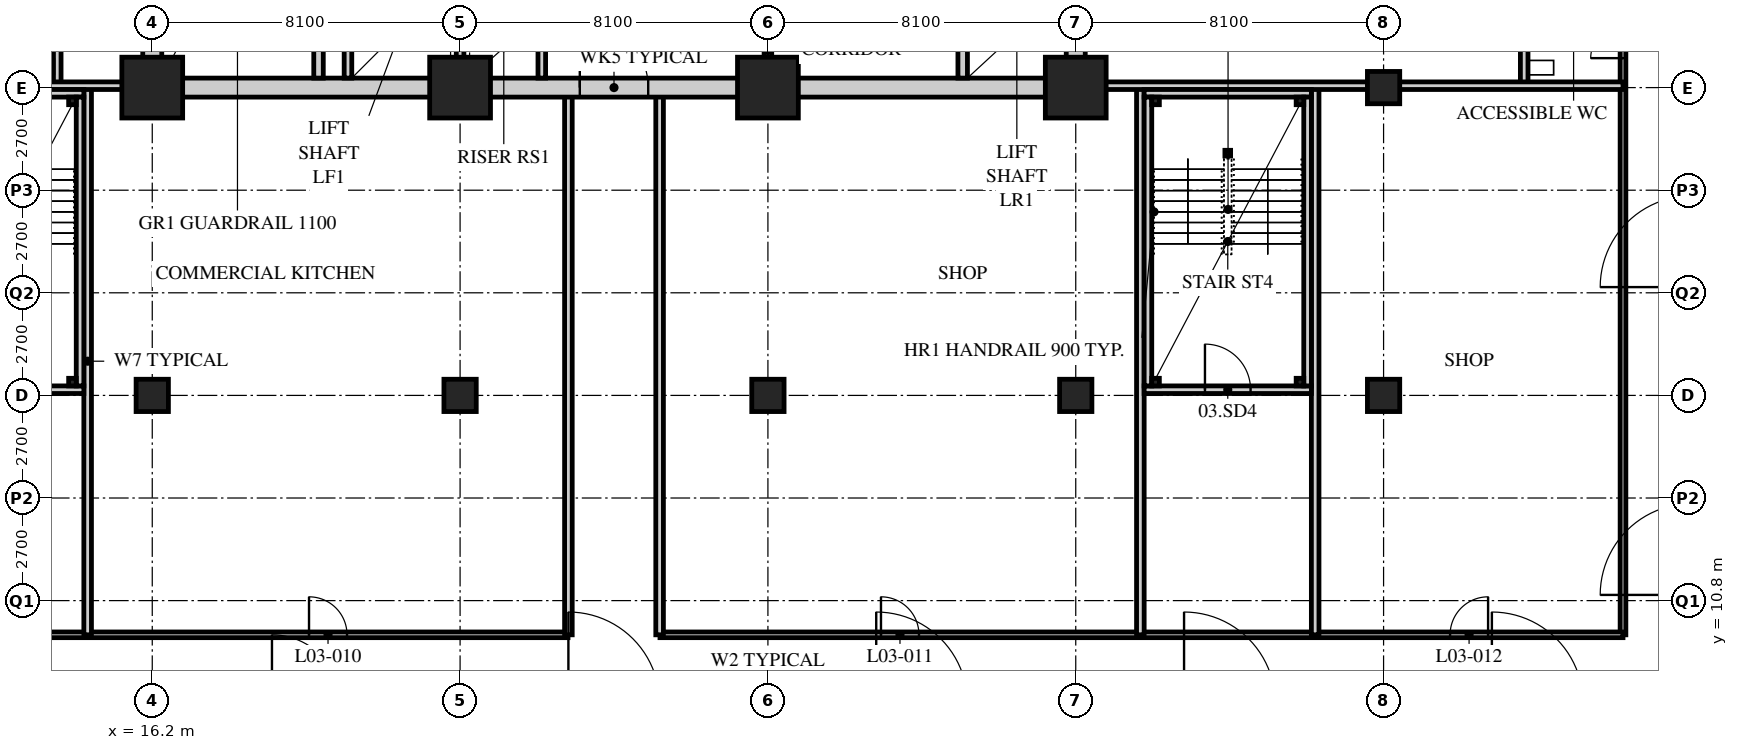
"""IFC4 building model, lengths in metres.
Left out: names, types, materials, properties, quantities, classifications, styles, units other than length and angle.
Written with IfcOpenShell. Run it as: python <this file> out.ifc"""

import sys

from ifc_helpers import new_model, si_unit, direction, frame, frame_2d, origin, origin_2d, place, context, subcontext, project, spatial, rectangle, hollow_rectangle, extrude, element, fill, save


model = new_model("IFC4")
c1 = context("Model", 3, precision=1e-05, world=origin(), true_north=direction((0.0, 1.0)))
c2 = subcontext(c1, "Body", "Model", "MODEL_VIEW")
j1 = project(units=[si_unit("LENGTHUNIT", "METRE"), si_unit("PLANEANGLEUNIT", "RADIAN")], contexts=[c1])
p1 = place(None, origin())
s1 = spatial("IfcSite", under=j1, at=p1, CompositionType="ELEMENT")
p2 = place(p1, origin())
s2 = spatial("IfcBuilding", under=s1, at=p2, CompositionType="ELEMENT")
p3 = place(p2, frame((0.0, 0.0, 16.8)))
s3 = spatial("IfcBuildingStorey", under=s2, at=p3, CompositionType="ELEMENT", Elevation=16.8)
p4 = place(p3, frame((16.2, 16.2, 0.0), z_axis=(0.0, 0.0, 1.0), x_axis=(1.0, 0.0, 0.0)))
e1 = element("IfcColumn", 1, at=p4, inside=s3, PredefinedType="COLUMN", context=c2, shape_type="SweptSolid", body=[
    extrude(hollow_rectangle(XDim=0.85, YDim=0.85, WallThickness=0.085, at=origin_2d()), origin(), (0.0, 0.0, 1.0), 5.4),
])
p5 = place(p3, frame((16.2, 24.3, 0.0), z_axis=(0.0, 0.0, 1.0), x_axis=(1.0, 0.0, 0.0)))
e2 = element("IfcColumn", 2, at=p5, inside=s3, PredefinedType="COLUMN", context=c2, shape_type="SweptSolid", body=[
    extrude(hollow_rectangle(XDim=1.6, YDim=1.6, WallThickness=0.15, at=origin_2d()), origin(), (0.0, 0.0, 1.0), 5.4),
])
p6 = place(p3, frame((24.3, 16.2, 0.0), z_axis=(0.0, 0.0, 1.0), x_axis=(1.0, 0.0, 0.0)))
e3 = element("IfcColumn", 3, at=p6, inside=s3, PredefinedType="COLUMN", context=c2, shape_type="SweptSolid", body=[
    extrude(hollow_rectangle(XDim=0.85, YDim=0.85, WallThickness=0.085, at=origin_2d()), origin(), (0.0, 0.0, 1.0), 5.4),
])
p7 = place(p3, frame((24.3, 24.3, 0.0), z_axis=(0.0, 0.0, 1.0), x_axis=(1.0, 0.0, 0.0)))
e4 = element("IfcColumn", 4, at=p7, inside=s3, PredefinedType="COLUMN", context=c2, shape_type="SweptSolid", body=[
    extrude(hollow_rectangle(XDim=1.6, YDim=1.6, WallThickness=0.15, at=origin_2d()), origin(), (0.0, 0.0, 1.0), 5.4),
])
p8 = place(p3, frame((32.4, 16.2, 0.0), z_axis=(0.0, 0.0, 1.0), x_axis=(1.0, 0.0, 0.0)))
e5 = element("IfcColumn", 5, at=p8, inside=s3, PredefinedType="COLUMN", context=c2, shape_type="SweptSolid", body=[
    extrude(hollow_rectangle(XDim=0.85, YDim=0.85, WallThickness=0.085, at=origin_2d()), origin(), (0.0, 0.0, 1.0), 5.4),
])
p9 = place(p3, frame((32.4, 24.3, 0.0), z_axis=(0.0, 0.0, 1.0), x_axis=(1.0, 0.0, 0.0)))
e6 = element("IfcColumn", 6, at=p9, inside=s3, PredefinedType="COLUMN", context=c2, shape_type="SweptSolid", body=[
    extrude(hollow_rectangle(XDim=1.6, YDim=1.6, WallThickness=0.15, at=origin_2d()), origin(), (0.0, 0.0, 1.0), 5.4),
])
p10 = place(p3, frame((40.5, 16.2, 0.0), z_axis=(0.0, 0.0, 1.0), x_axis=(1.0, 0.0, 0.0)))
e7 = element("IfcColumn", 7, at=p10, inside=s3, PredefinedType="COLUMN", context=c2, shape_type="SweptSolid", body=[
    extrude(hollow_rectangle(XDim=0.85, YDim=0.85, WallThickness=0.085, at=origin_2d()), origin(), (0.0, 0.0, 1.0), 5.4),
])
p11 = place(p3, frame((40.5, 24.3, 0.0), z_axis=(0.0, 0.0, 1.0), x_axis=(1.0, 0.0, 0.0)))
e8 = element("IfcColumn", 8, at=p11, inside=s3, PredefinedType="COLUMN", context=c2, shape_type="SweptSolid", body=[
    extrude(hollow_rectangle(XDim=1.6, YDim=1.6, WallThickness=0.15, at=origin_2d()), origin(), (0.0, 0.0, 1.0), 5.4),
])
for number, where, z_axis, x_axis in (
    (9, (48.6, 16.2, 0.0), (0.0, 0.0, 1.0), (1.0, 0.0, 0.0)),
    (10, (48.6, 24.3, 0.0), (0.0, 0.0, 1.0), (1.0, 0.0, 0.0)),
):
    element("IfcColumn", number, at=place(p3, frame(where, z_axis=z_axis, x_axis=x_axis)), inside=s3, PredefinedType="COLUMN", context=c2, shape_type="SweptSolid", body=[
        extrude(hollow_rectangle(XDim=0.85, YDim=0.85, WallThickness=0.085, at=origin_2d()), origin(), (0.0, 0.0, 1.0), 5.4),
    ])
p12 = place(p3, frame((54.9, 9.9, 0.0), z_axis=(0.0, 0.0, 1.0), x_axis=(0.0, 1.0, 0.0)))
e11 = element("IfcWall", 11, at=p12, inside=s3, PredefinedType="PARTITIONING", context=c2, shape_type="SweptSolid", body=[
    extrude(rectangle(XDim=30.75, YDim=0.15, at=frame_2d((15.375, 0.0))), origin(), (0.0, 0.0, 1.0), 5.15),
])
p13 = place(p12, frame((15.175, 0.0, 0.0)))
e12 = element("IfcOpeningElement", 12, at=p13, cuts=e11, PredefinedType="OPENING", context=c2, shape_type="SweptSolid", body=[
    extrude(rectangle(XDim=0.85, YDim=2.1, at=frame_2d((0.425, 1.05))), frame((0.0, 0.085, 0.0), z_axis=(0.0, -1.0, 0.0), x_axis=(1.0, 0.0, 0.0)), (0.0, 0.0, 1.0), 0.17),
])
p14 = place(p12, frame((17.725, 0.0, 0.0)))
e13 = element("IfcOpeningElement", 13, at=p14, cuts=e11, PredefinedType="OPENING", context=c2, shape_type="SweptSolid", body=[
    extrude(rectangle(XDim=1.0, YDim=2.1, at=frame_2d((0.5, 1.05))), frame((0.0, 0.085, 0.0), z_axis=(0.0, -1.0, 0.0), x_axis=(1.0, 0.0, 0.0)), (0.0, 0.0, 1.0), 0.17),
])
p15 = place(p12, frame((20.575, 0.0, 0.0)))
e14 = element("IfcOpeningElement", 14, at=p15, cuts=e11, PredefinedType="OPENING", context=c2, shape_type="SweptSolid", body=[
    extrude(rectangle(XDim=1.0, YDim=2.1, at=frame_2d((0.5, 1.05))), frame((0.0, 0.085, 0.0), z_axis=(0.0, -1.0, 0.0), x_axis=(1.0, 0.0, 0.0)), (0.0, 0.0, 1.0), 0.17),
])
p16 = place(p12, frame((24.025, 0.0, 0.0)))
e15 = element("IfcOpeningElement", 15, at=p16, cuts=e11, PredefinedType="OPENING", context=c2, shape_type="SweptSolid", body=[
    extrude(rectangle(XDim=1.0, YDim=2.1, at=frame_2d((0.5, 1.05))), frame((0.0, 0.085, 0.0), z_axis=(0.0, -1.0, 0.0), x_axis=(1.0, 0.0, 0.0)), (0.0, 0.0, 1.0), 0.17),
])
p17 = place(p12, frame((28.075, 0.0, 0.0)))
e16 = element("IfcOpeningElement", 16, at=p17, cuts=e11, PredefinedType="OPENING", context=c2, shape_type="SweptSolid", body=[
    extrude(rectangle(XDim=1.0, YDim=2.1, at=frame_2d((0.5, 1.05))), frame((0.0, 0.085, 0.0), z_axis=(0.0, -1.0, 0.0), x_axis=(1.0, 0.0, 0.0)), (0.0, 0.0, 1.0), 0.17),
])
p18 = place(p3, frame((9.9, 9.9, 0.0), z_axis=(0.0, 0.0, 1.0), x_axis=(1.0, 0.0, 0.0)))
e17 = element("IfcWall", 17, at=p18, inside=s3, PredefinedType="PARTITIONING", context=c2, shape_type="SweptSolid", body=[
    extrude(rectangle(XDim=17.24, YDim=0.15, at=frame_2d((8.62, 0.0))), origin(), (0.0, 0.0, 1.0), 5.15),
])
p19 = place(p18, frame((10.425, 0.0, 0.0)))
e18 = element("IfcOpeningElement", 18, at=p19, cuts=e17, PredefinedType="OPENING", context=c2, shape_type="SweptSolid", body=[
    extrude(rectangle(XDim=1.0, YDim=2.1, at=frame_2d((0.5, 1.05))), frame((0.0, 0.085, 0.0), z_axis=(0.0, -1.0, 0.0), x_axis=(1.0, 0.0, 0.0)), (0.0, 0.0, 1.0), 0.17),
])
p20 = place(p3, frame((29.56, 9.9, 0.0), z_axis=(0.0, 0.0, 1.0), x_axis=(1.0, 0.0, 0.0)))
e19 = element("IfcWall", 19, at=p20, inside=s3, PredefinedType="PARTITIONING", context=c2, shape_type="SweptSolid", body=[
    extrude(rectangle(XDim=25.34, YDim=0.15, at=frame_2d((12.67, 0.0))), origin(), (0.0, 0.0, 1.0), 5.15),
])
p21 = place(p20, frame((5.815, 0.0, 0.0)))
e20 = element("IfcOpeningElement", 20, at=p21, cuts=e19, PredefinedType="OPENING", context=c2, shape_type="SweptSolid", body=[
    extrude(rectangle(XDim=1.0, YDim=2.1, at=frame_2d((0.5, 1.05))), frame((0.0, 0.085, 0.0), z_axis=(0.0, -1.0, 0.0), x_axis=(1.0, 0.0, 0.0)), (0.0, 0.0, 1.0), 0.17),
])
p22 = place(p20, frame((20.79, 0.0, 0.0)))
e21 = element("IfcOpeningElement", 21, at=p22, cuts=e19, PredefinedType="OPENING", context=c2, shape_type="SweptSolid", body=[
    extrude(rectangle(XDim=1.0, YDim=2.1, at=frame_2d((0.5, 1.05))), frame((0.0, 0.085, 0.0), z_axis=(0.0, -1.0, 0.0), x_axis=(1.0, 0.0, 0.0)), (0.0, 0.0, 1.0), 0.17),
])
p23 = place(p3, frame((13.7, 24.3, 0.0), z_axis=(0.0, 0.0, 1.0), x_axis=(0.0, 1.0, 0.0)))
e22 = element("IfcWall", 22, at=p23, inside=s3, PredefinedType="SOLIDWALL", context=c2, shape_type="SweptSolid", body=[
    extrude(rectangle(XDim=4.8, YDim=0.2, at=frame_2d((2.4, 0.0))), origin(), (0.0, 0.0, 1.0), 5.15),
])
p24 = place(p3, frame((52.3, 24.3, 0.0), z_axis=(0.0, 0.0, 1.0), x_axis=(0.0, 1.0, 0.0)))
e23 = element("IfcWall", 23, at=p24, inside=s3, PredefinedType="SOLIDWALL", context=c2, shape_type="SweptSolid", body=[
    extrude(rectangle(XDim=2.4, YDim=0.2, at=frame_2d((1.2, 0.0))), origin(), (0.0, 0.0, 1.0), 5.15),
])
for number, where, z_axis, x_axis in (
    (24, (14.5, 9.9, 0.0), (0.0, 0.0, 1.0), (0.0, 1.0, 0.0)),
    (25, (42.2, 9.9, 0.0), (0.0, 0.0, 1.0), (0.0, 1.0, 0.0)),
    (26, (46.8, 9.9, 0.0), (0.0, 0.0, 1.0), (0.0, 1.0, 0.0)),
    (27, (27.15, 9.9, 0.0), (0.0, 0.0, 1.0), (0.0, 1.0, 0.0)),
    (28, (29.55, 9.9, 0.0), (0.0, 0.0, 1.0), (0.0, 1.0, 0.0)),
):
    element("IfcWall", number, at=place(p3, frame(where, z_axis=z_axis, x_axis=x_axis)), inside=s3, PredefinedType="SOLIDWALL", context=c2, shape_type="SweptSolid", body=[
        extrude(rectangle(XDim=14.4, YDim=0.2, at=frame_2d((7.2, 0.0))), origin(), (0.0, 0.0, 1.0), 5.15),
    ])
p25 = place(p3, frame((9.9, 24.35, 0.0), z_axis=(0.0, 0.0, 1.0), x_axis=(1.0, 0.0, 0.0)))
e29 = element("IfcWall", 29, at=p25, inside=s3, PredefinedType="SOLIDWALL", context=c2, shape_type="SweptSolid", body=[
    extrude(rectangle(XDim=6.3, YDim=0.2, at=frame_2d((3.15, 0.0))), origin(), (0.0, 0.0, 1.0), 4.538),
])
p26 = place(p3, frame((40.5, 24.35, 0.0), z_axis=(0.0, 0.0, 1.0), x_axis=(1.0, 0.0, 0.0)))
e30 = element("IfcWall", 30, at=p26, inside=s3, PredefinedType="SOLIDWALL", context=c2, shape_type="SweptSolid", body=[
    extrude(rectangle(XDim=14.4, YDim=0.2, at=frame_2d((7.2, 0.0))), origin(), (0.0, 0.0, 1.0), 4.538),
])
p27 = place(p3, frame((15.95, 24.3, 0.0), z_axis=(0.0, 0.0, 1.0), x_axis=(1.0, 0.0, 0.0)))
e31 = element("IfcWall", 31, at=p27, inside=s3, PredefinedType="SOLIDWALL", context=c2, shape_type="SweptSolid", body=[
    extrude(rectangle(XDim=24.8, YDim=0.5, at=frame_2d((12.4, 0.0))), origin(), (0.0, 0.0, 1.0), 4.5),
])
p28 = place(p27, frame((11.5, 0.0, 0.0)))
e32 = element("IfcOpeningElement", 32, at=p28, cuts=e31, PredefinedType="OPENING", context=c2, shape_type="SweptSolid", body=[
    extrude(rectangle(XDim=1.8, YDim=2.4, at=frame_2d((0.9, 1.2))), frame((0.0, 0.26, 0.0), z_axis=(0.0, -1.0, 0.0), x_axis=(1.0, 0.0, 0.0)), (0.0, 0.0, 1.0), 0.52),
])
for number, where, z_axis, x_axis in (
    (33, (16.2, 24.55, 0.0), (0.0, 0.0, 1.0), (0.0, 1.0, 0.0)),
    (34, (40.5, 24.55, 0.0), (0.0, 0.0, 1.0), (0.0, 1.0, 0.0)),
):
    element("IfcWall", number, at=place(p3, frame(where, z_axis=z_axis, x_axis=x_axis)), inside=s3, PredefinedType="SOLIDWALL", context=c2, shape_type="SweptSolid", body=[
        extrude(rectangle(XDim=15.7, YDim=0.5, at=frame_2d((7.85, 0.0))), origin(), (0.0, 0.0, 1.0), 4.538),
    ])
p29 = place(p3, frame((24.3, 24.55, 0.0), z_axis=(0.0, 0.0, 1.0), x_axis=(0.0, 1.0, 0.0)))
e35 = element("IfcWall", 35, at=p29, inside=s3, PredefinedType="SOLIDWALL", context=c2, shape_type="SweptSolid", body=[
    extrude(rectangle(XDim=7.75, YDim=0.2, at=frame_2d((3.875, 0.0))), origin(), (0.0, 0.0, 1.0), 4.45),
])
p30 = place(p29, frame((4.6, 0.0, 0.0)))
e36 = element("IfcOpeningElement", 36, at=p30, cuts=e35, PredefinedType="OPENING", context=c2, shape_type="SweptSolid", body=[
    extrude(rectangle(XDim=1.2, YDim=2.1, at=frame_2d((0.6, 1.05))), frame((0.0, 0.11, 0.0), z_axis=(0.0, -1.0, 0.0), x_axis=(1.0, 0.0, 0.0)), (0.0, 0.0, 1.0), 0.22),
])
p31 = place(p3, frame((20.575, 24.55, 0.0), z_axis=(0.0, 0.0, 1.0), x_axis=(0.0, 1.0, 0.0)))
e37 = element("IfcWall", 37, at=p31, inside=s3, PredefinedType="SOLIDWALL", context=c2, shape_type="SweptSolid", body=[
    extrude(rectangle(XDim=7.75, YDim=0.25, at=frame_2d((3.875, 0.0))), origin(), (0.0, 0.0, 1.0), 5.15),
])
p32 = place(p31, frame((6.2, 0.0, 0.0)))
e38 = element("IfcOpeningElement", 38, at=p32, cuts=e37, PredefinedType="OPENING", context=c2, shape_type="SweptSolid", body=[
    extrude(rectangle(XDim=1.2, YDim=2.1, at=frame_2d((0.6, 1.05))), frame((0.0, 0.135, 0.0), z_axis=(0.0, -1.0, 0.0), x_axis=(1.0, 0.0, 0.0)), (0.0, 0.0, 1.0), 0.27),
])
p33 = place(p3, frame((21.35, 24.55, 0.0), z_axis=(0.0, 0.0, 1.0), x_axis=(0.0, 1.0, 0.0)))
e39 = element("IfcWall", 39, at=p33, inside=s3, PredefinedType="SOLIDWALL", context=c2, shape_type="SweptSolid", body=[
    extrude(rectangle(XDim=2.6, YDim=0.2, at=frame_2d((1.3, 0.0))), origin(), (0.0, 0.0, 1.0), 5.15),
])
p34 = place(p3, frame((26.45, 24.55, 0.0), z_axis=(0.0, 0.0, 1.0), x_axis=(0.0, 1.0, 0.0)))
e40 = element("IfcWall", 40, at=p34, inside=s3, PredefinedType="SOLIDWALL", context=c2, shape_type="SweptSolid", body=[
    extrude(rectangle(XDim=1.6, YDim=0.2, at=frame_2d((0.8, 0.0))), origin(), (0.0, 0.0, 1.0), 5.15),
])
p35 = place(p3, frame((37.525, 24.55, 0.0), z_axis=(0.0, 0.0, 1.0), x_axis=(0.0, 1.0, 0.0)))
e41 = element("IfcWall", 41, at=p35, inside=s3, PredefinedType="SOLIDWALL", context=c2, shape_type="SweptSolid", body=[
    extrude(rectangle(XDim=7.75, YDim=0.25, at=frame_2d((3.875, 0.0))), origin(), (0.0, 0.0, 1.0), 5.15),
])
p36 = place(p3, frame((32.4, 24.55, 0.0), z_axis=(0.0, 0.0, 1.0), x_axis=(0.0, 1.0, 0.0)))
e42 = element("IfcWall", 42, at=p36, inside=s3, PredefinedType="PARTITIONING", context=c2, shape_type="SweptSolid", body=[
    extrude(rectangle(XDim=7.75, YDim=0.2, at=frame_2d((3.875, 0.0))), origin(), (0.0, 0.0, 1.0), 4.45),
])
p37 = place(p36, frame((1.15, 0.0, 0.0)))
e43 = element("IfcOpeningElement", 43, at=p37, cuts=e42, PredefinedType="OPENING", context=c2, shape_type="SweptSolid", body=[
    extrude(rectangle(XDim=0.9, YDim=2.1, at=frame_2d((0.45, 1.05))), frame((0.0, 0.11, 0.0), z_axis=(0.0, -1.0, 0.0), x_axis=(1.0, 0.0, 0.0)), (0.0, 0.0, 1.0), 0.22),
])
p38 = place(p36, frame((3.85, 0.0, 0.0)))
e44 = element("IfcOpeningElement", 44, at=p38, cuts=e42, PredefinedType="OPENING", context=c2, shape_type="SweptSolid", body=[
    extrude(rectangle(XDim=1.0, YDim=2.1, at=frame_2d((0.5, 1.05))), frame((0.0, 0.11, 0.0), z_axis=(0.0, -1.0, 0.0), x_axis=(1.0, 0.0, 0.0)), (0.0, 0.0, 1.0), 0.22),
])
p39 = place(p36, frame((6.1, 0.0, 0.0)))
e45 = element("IfcOpeningElement", 45, at=p39, cuts=e42, PredefinedType="OPENING", context=c2, shape_type="SweptSolid", body=[
    extrude(rectangle(XDim=0.9, YDim=2.1, at=frame_2d((0.45, 1.05))), frame((0.0, 0.11, 0.0), z_axis=(0.0, -1.0, 0.0), x_axis=(1.0, 0.0, 0.0)), (0.0, 0.0, 1.0), 0.22),
])
p40 = place(p3, frame((10.0, 16.35, 0.0), z_axis=(0.0, 0.0, 1.0), x_axis=(1.0, 0.0, 0.0)))
e46 = element("IfcWall", 46, at=p40, inside=s3, PredefinedType="SOLIDWALL", context=c2, shape_type="SweptSolid", body=[
    extrude(rectangle(XDim=4.4, YDim=0.2, at=frame_2d((2.2, 0.0))), origin(), (0.0, 0.0, 1.0), 4.538),
])
p41 = place(p40, frame((1.6, 0.0, 0.0)))
e47 = element("IfcOpeningElement", 47, at=p41, cuts=e46, PredefinedType="OPENING", context=c2, shape_type="SweptSolid", body=[
    extrude(rectangle(XDim=1.2, YDim=2.1, at=frame_2d((0.6, 1.05))), frame((0.0, 0.11, 0.0), z_axis=(0.0, -1.0, 0.0), x_axis=(1.0, 0.0, 0.0)), (0.0, 0.0, 1.0), 0.22),
])
p42 = place(p3, frame((10.0, 24.15, 0.0), z_axis=(0.0, 0.0, 1.0), x_axis=(1.0, 0.0, 0.0)))
e48 = element("IfcWall", 48, at=p42, inside=s3, PredefinedType="SOLIDWALL", context=c2, shape_type="SweptSolid", body=[
    extrude(rectangle(XDim=4.4, YDim=0.2, at=frame_2d((2.2, 0.0))), origin(), (0.0, 0.0, 1.0), 4.538),
])
p43 = place(p3, frame((14.3, 16.45, 0.0), z_axis=(0.0, 0.0, 1.0), x_axis=(0.0, 1.0, 0.0)))
e49 = element("IfcWall", 49, at=p43, inside=s3, PredefinedType="SOLIDWALL", context=c2, shape_type="SweptSolid", body=[
    extrude(rectangle(XDim=7.6, YDim=0.2, at=frame_2d((3.8, 0.0))), origin(), (0.0, 0.0, 1.0), 5.15),
])
p44 = place(p3, frame((42.3, 16.35, 0.0), z_axis=(0.0, 0.0, 1.0), x_axis=(1.0, 0.0, 0.0)))
e50 = element("IfcWall", 50, at=p44, inside=s3, PredefinedType="SOLIDWALL", context=c2, shape_type="SweptSolid", body=[
    extrude(rectangle(XDim=4.4, YDim=0.2, at=frame_2d((2.2, 0.0))), origin(), (0.0, 0.0, 1.0), 4.538),
])
p45 = place(p44, frame((1.6, 0.0, 0.0)))
e51 = element("IfcOpeningElement", 51, at=p45, cuts=e50, PredefinedType="OPENING", context=c2, shape_type="SweptSolid", body=[
    extrude(rectangle(XDim=1.2, YDim=2.1, at=frame_2d((0.6, 1.05))), frame((0.0, 0.11, 0.0), z_axis=(0.0, -1.0, 0.0), x_axis=(1.0, 0.0, 0.0)), (0.0, 0.0, 1.0), 0.22),
])
p46 = place(p3, frame((42.3, 24.15, 0.0), z_axis=(0.0, 0.0, 1.0), x_axis=(1.0, 0.0, 0.0)))
e52 = element("IfcWall", 52, at=p46, inside=s3, PredefinedType="SOLIDWALL", context=c2, shape_type="SweptSolid", body=[
    extrude(rectangle(XDim=4.4, YDim=0.2, at=frame_2d((2.2, 0.0))), origin(), (0.0, 0.0, 1.0), 4.538),
])
for number, where, z_axis, x_axis in (
    (53, (42.4, 16.45, 0.0), (0.0, 0.0, 1.0), (0.0, 1.0, 0.0)),
    (54, (46.6, 16.45, 0.0), (0.0, 0.0, 1.0), (0.0, 1.0, 0.0)),
):
    element("IfcWall", number, at=place(p3, frame(where, z_axis=z_axis, x_axis=x_axis)), inside=s3, PredefinedType="SOLIDWALL", context=c2, shape_type="SweptSolid", body=[
        extrude(rectangle(XDim=7.6, YDim=0.2, at=frame_2d((3.8, 0.0))), origin(), (0.0, 0.0, 1.0), 5.15),
    ])
for number, where, z_axis, x_axis in (
    (55, (14.1, 23.95, 0.0), (0.0, 0.0, 1.0), (1.0, 0.0, 0.0)),
    (56, (14.1, 16.55, 0.0), (0.0, 0.0, 1.0), (1.0, 0.0, 0.0)),
    (57, (42.6, 23.95, 0.0), (0.0, 0.0, 1.0), (1.0, 0.0, 0.0)),
    (58, (46.4, 23.95, 0.0), (0.0, 0.0, 1.0), (1.0, 0.0, 0.0)),
    (59, (42.6, 16.55, 0.0), (0.0, 0.0, 1.0), (1.0, 0.0, 0.0)),
    (60, (46.4, 16.55, 0.0), (0.0, 0.0, 1.0), (1.0, 0.0, 0.0)),
):
    element("IfcColumn", number, at=place(p3, frame(where, z_axis=z_axis, x_axis=x_axis)), inside=s3, PredefinedType="COLUMN", context=c2, shape_type="SweptSolid", body=[
        extrude(hollow_rectangle(XDim=0.2, YDim=0.2, WallThickness=0.012, at=origin_2d()), origin(), (0.0, 0.0, 1.0), 5.4),
    ])
p47 = place(p3, frame((44.5, 22.575, 0.0), z_axis=(0.0, 0.0, 1.0), x_axis=(1.0, 0.0, 0.0)))
e61 = element("IfcColumn", 61, at=p47, inside=s3, PredefinedType="COLUMN", context=c2, shape_type="SweptSolid", body=[
    extrude(hollow_rectangle(XDim=0.15, YDim=0.15, WallThickness=0.01, at=origin_2d()), origin(), (0.0, 0.0, 1.0), 5.4),
])
p48 = place(p13, origin())
e62 = element("IfcDoor", 62, at=p48, inside=s3, OperationType="SINGLE_SWING_LEFT", PredefinedType="DOOR", context=c2, shape_type="SweptSolid", body=[
    extrude(rectangle(XDim=0.85, YDim=2.1, at=frame_2d((0.425, 1.05))), frame((0.0, 0.025, 0.0), z_axis=(0.0, -1.0, 0.0), x_axis=(1.0, 0.0, 0.0)), (0.0, 0.0, 1.0), 0.05),
])
fill(e12, e62)
p49 = place(p19, origin())
e63 = element("IfcDoor", 63, at=p49, inside=s3, OperationType="SINGLE_SWING_LEFT", PredefinedType="DOOR", context=c2, shape_type="SweptSolid", body=[
    extrude(rectangle(XDim=1.0, YDim=2.1, at=frame_2d((0.5, 1.05))), frame((0.0, 0.025, 0.0), z_axis=(0.0, -1.0, 0.0), x_axis=(1.0, 0.0, 0.0)), (0.0, 0.0, 1.0), 0.05),
])
fill(e18, e63)
p50 = place(p21, origin())
e64 = element("IfcDoor", 64, at=p50, inside=s3, OperationType="SINGLE_SWING_LEFT", PredefinedType="DOOR", context=c2, shape_type="SweptSolid", body=[
    extrude(rectangle(XDim=1.0, YDim=2.1, at=frame_2d((0.5, 1.05))), frame((0.0, 0.025, 0.0), z_axis=(0.0, -1.0, 0.0), x_axis=(1.0, 0.0, 0.0)), (0.0, 0.0, 1.0), 0.05),
])
fill(e20, e64)
p51 = place(p22, origin())
e65 = element("IfcDoor", 65, at=p51, inside=s3, OperationType="SINGLE_SWING_RIGHT", PredefinedType="DOOR", context=c2, shape_type="SweptSolid", body=[
    extrude(rectangle(XDim=1.0, YDim=2.1, at=frame_2d((0.5, 1.05))), frame((0.0, 0.025, 0.0), z_axis=(0.0, -1.0, 0.0), x_axis=(1.0, 0.0, 0.0)), (0.0, 0.0, 1.0), 0.05),
])
fill(e21, e65)
p52 = place(p28, origin())
e66 = element("IfcDoor", 66, at=p52, inside=s3, OperationType="DOUBLE_DOOR_SINGLE_SWING", PredefinedType="DOOR", context=c2, shape_type="SweptSolid", body=[
    extrude(rectangle(XDim=1.8, YDim=2.4, at=frame_2d((0.9, 1.2))), frame((0.0, 0.025, 0.0), z_axis=(0.0, -1.0, 0.0), x_axis=(1.0, 0.0, 0.0)), (0.0, 0.0, 1.0), 0.05),
])
fill(e32, e66)
p53 = place(p45, origin())
e67 = element("IfcDoor", 67, at=p53, inside=s3, OperationType="SINGLE_SWING_LEFT", PredefinedType="DOOR", context=c2, shape_type="SweptSolid", body=[
    extrude(rectangle(XDim=1.2, YDim=2.1, at=frame_2d((0.6, 1.05))), frame((0.0, 0.025, 0.0), z_axis=(0.0, -1.0, 0.0), x_axis=(1.0, 0.0, 0.0)), (0.0, 0.0, 1.0), 0.05),
])
fill(e51, e67)
save(model, sys.argv[1])
